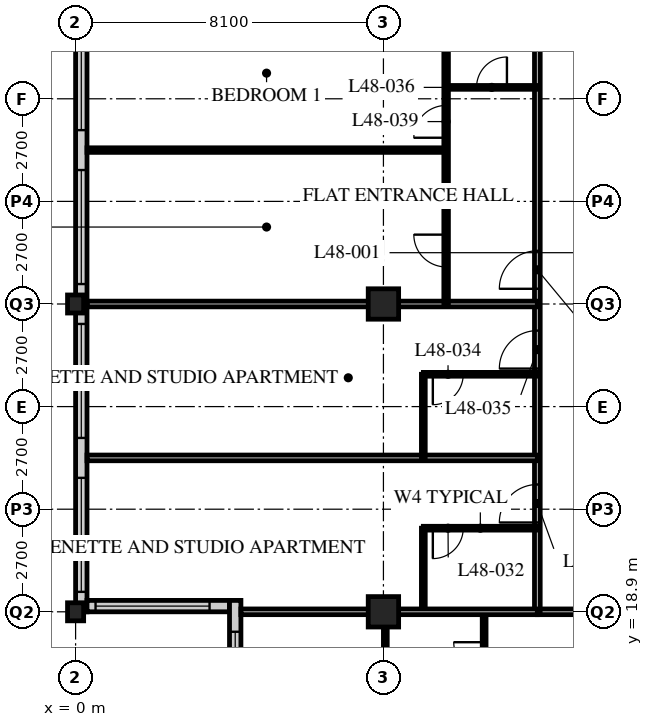
"""IFC4 building model, lengths in metres.
Left out: names, types, materials, properties, quantities, classifications, styles, units other than length and angle.
Written with IfcOpenShell. Run it as: python <this file> out.ifc"""

import sys

from ifc_helpers import new_model, si_unit, direction, frame, frame_2d, origin, origin_2d, place, context, subcontext, project, spatial, rectangle, hollow_rectangle, i_section, extrude, element, fill, save


model = new_model("IFC4")
c1 = context("Model", 3, precision=1e-05, world=origin(), true_north=direction((0.0, 1.0)))
c2 = subcontext(c1, "Body", "Model", "MODEL_VIEW")
j1 = project(units=[si_unit("LENGTHUNIT", "METRE"), si_unit("PLANEANGLEUNIT", "RADIAN")], contexts=[c1])
p1 = place(None, origin())
s1 = spatial("IfcSite", under=j1, at=p1, CompositionType="ELEMENT")
p2 = place(p1, origin())
s2 = spatial("IfcBuilding", under=s1, at=p2, CompositionType="ELEMENT")
p3 = place(p2, frame((0.0, 0.0, 188.4)))
s3 = spatial("IfcBuildingStorey", under=s2, at=p3, CompositionType="ELEMENT", Elevation=188.4)
for number, where, z_axis, x_axis in (
    (1, (0.0, 18.9, 0.0), (0.0, 0.0, 1.0), (1.0, 0.0, 0.0)),
    (2, (0.0, 27.0, 0.0), (0.0, 0.0, 1.0), (1.0, 0.0, 0.0)),
):
    element("IfcColumn", number, at=place(p3, frame(where, z_axis=z_axis, x_axis=x_axis)), inside=s3, PredefinedType="COLUMN", context=c2, shape_type="SweptSolid", body=[
        extrude(i_section(OverallWidth=0.424, OverallDepth=0.475, WebThickness=0.048, FlangeThickness=0.077, FilletRadius=0.015, at=origin_2d()), origin(), (0.0, 0.0, 1.0), 3.6),
    ])
for number, where, z_axis, x_axis in (
    (3, (8.1, 18.9, 0.0), (0.0, 0.0, 1.0), (1.0, 0.0, 0.0)),
    (4, (8.1, 27.0, 0.0), (0.0, 0.0, 1.0), (1.0, 0.0, 0.0)),
):
    element("IfcColumn", number, at=place(p3, frame(where, z_axis=z_axis, x_axis=x_axis)), inside=s3, PredefinedType="COLUMN", context=c2, shape_type="SweptSolid", body=[
        extrude(hollow_rectangle(XDim=0.8, YDim=0.8, WallThickness=0.08, at=origin_2d()), origin(), (0.0, 0.0, 1.0), 3.6),
    ])
p4 = place(p3, frame((0.15, 51.0, 0.0), z_axis=(0.0, 0.0, 1.0), x_axis=(0.0, -1.0, 0.0)))
e5 = element("IfcWall", 5, at=p4, inside=s3, PredefinedType="SOLIDWALL", context=c2, shape_type="SweptSolid", body=[
    extrude(rectangle(XDim=32.1, YDim=0.3, at=frame_2d((16.05, 0.0))), origin(), (0.0, 0.0, 1.0), 3.39),
])
p5 = place(p4, frame((0.225, 0.0, 0.6)))
e6 = element("IfcOpeningElement", 6, at=p5, cuts=e5, PredefinedType="OPENING", context=c2, shape_type="SweptSolid", body=[
    extrude(rectangle(XDim=3.0, YDim=2.4, at=frame_2d((1.5, 1.2))), frame((0.0, 0.16, 0.0), z_axis=(0.0, -1.0, 0.0), x_axis=(1.0, 0.0, 0.0)), (0.0, 0.0, 1.0), 0.32),
])
p6 = place(p4, frame((4.275, 0.0, 0.6)))
e7 = element("IfcOpeningElement", 7, at=p6, cuts=e5, PredefinedType="OPENING", context=c2, shape_type="SweptSolid", body=[
    extrude(rectangle(XDim=3.0, YDim=2.4, at=frame_2d((1.5, 1.2))), frame((0.0, 0.16, 0.0), z_axis=(0.0, -1.0, 0.0), x_axis=(1.0, 0.0, 0.0)), (0.0, 0.0, 1.0), 0.32),
])
p7 = place(p4, frame((8.325, 0.0, 0.6)))
e8 = element("IfcOpeningElement", 8, at=p7, cuts=e5, PredefinedType="OPENING", context=c2, shape_type="SweptSolid", body=[
    extrude(rectangle(XDim=3.0, YDim=2.4, at=frame_2d((1.5, 1.2))), frame((0.0, 0.16, 0.0), z_axis=(0.0, -1.0, 0.0), x_axis=(1.0, 0.0, 0.0)), (0.0, 0.0, 1.0), 0.32),
])
p8 = place(p4, frame((12.375, 0.0, 0.6)))
e9 = element("IfcOpeningElement", 9, at=p8, cuts=e5, PredefinedType="OPENING", context=c2, shape_type="SweptSolid", body=[
    extrude(rectangle(XDim=3.0, YDim=2.4, at=frame_2d((1.5, 1.2))), frame((0.0, 0.16, 0.0), z_axis=(0.0, -1.0, 0.0), x_axis=(1.0, 0.0, 0.0)), (0.0, 0.0, 1.0), 0.32),
])
p9 = place(p4, frame((16.425, 0.0, 0.6)))
e10 = element("IfcOpeningElement", 10, at=p9, cuts=e5, PredefinedType="OPENING", context=c2, shape_type="SweptSolid", body=[
    extrude(rectangle(XDim=3.0, YDim=2.4, at=frame_2d((1.5, 1.2))), frame((0.0, 0.16, 0.0), z_axis=(0.0, -1.0, 0.0), x_axis=(1.0, 0.0, 0.0)), (0.0, 0.0, 1.0), 0.32),
])
p10 = place(p4, frame((20.475, 0.0, 0.6)))
e11 = element("IfcOpeningElement", 11, at=p10, cuts=e5, PredefinedType="OPENING", context=c2, shape_type="SweptSolid", body=[
    extrude(rectangle(XDim=3.0, YDim=2.4, at=frame_2d((1.5, 1.2))), frame((0.0, 0.16, 0.0), z_axis=(0.0, -1.0, 0.0), x_axis=(1.0, 0.0, 0.0)), (0.0, 0.0, 1.0), 0.32),
])
p11 = place(p4, frame((24.525, 0.0, 0.6)))
e12 = element("IfcOpeningElement", 12, at=p11, cuts=e5, PredefinedType="OPENING", context=c2, shape_type="SweptSolid", body=[
    extrude(rectangle(XDim=3.0, YDim=2.4, at=frame_2d((1.5, 1.2))), frame((0.0, 0.16, 0.0), z_axis=(0.0, -1.0, 0.0), x_axis=(1.0, 0.0, 0.0)), (0.0, 0.0, 1.0), 0.32),
])
p12 = place(p4, frame((28.575, 0.0, 0.6)))
e13 = element("IfcOpeningElement", 13, at=p12, cuts=e5, PredefinedType="OPENING", context=c2, shape_type="SweptSolid", body=[
    extrude(rectangle(XDim=3.0, YDim=2.4, at=frame_2d((1.5, 1.2))), frame((0.0, 0.16, 0.0), z_axis=(0.0, -1.0, 0.0), x_axis=(1.0, 0.0, 0.0)), (0.0, 0.0, 1.0), 0.32),
])
p13 = place(p3, frame((0.3, 19.05, 0.0), z_axis=(0.0, 0.0, 1.0), x_axis=(1.0, 0.0, 0.0)))
e14 = element("IfcWall", 14, at=p13, inside=s3, PredefinedType="SOLIDWALL", context=c2, shape_type="SweptSolid", body=[
    extrude(rectangle(XDim=3.75, YDim=0.3, at=frame_2d((1.875, 0.0))), origin(), (0.0, 0.0, 1.0), 3.39),
])
p14 = place(p13, frame((0.225, 0.0, 0.6)))
e15 = element("IfcOpeningElement", 15, at=p14, cuts=e14, PredefinedType="OPENING", context=c2, shape_type="SweptSolid", body=[
    extrude(rectangle(XDim=3.0, YDim=2.0, at=frame_2d((1.5, 1.0))), frame((0.0, 0.16, 0.0), z_axis=(0.0, -1.0, 0.0), x_axis=(1.0, 0.0, 0.0)), (0.0, 0.0, 1.0), 0.32),
])
p15 = place(p3, frame((4.2, 19.2, 0.0), z_axis=(0.0, 0.0, 1.0), x_axis=(0.0, -1.0, 0.0)))
e16 = element("IfcWall", 16, at=p15, inside=s3, PredefinedType="SOLIDWALL", context=c2, shape_type="SweptSolid", body=[
    extrude(rectangle(XDim=4.35, YDim=0.3, at=frame_2d((2.175, 0.0))), origin(), (0.0, 0.0, 1.0), 3.39),
])
p16 = place(p15, frame((0.825, 0.0, 0.6)))
e17 = element("IfcOpeningElement", 17, at=p16, cuts=e16, PredefinedType="OPENING", context=c2, shape_type="SweptSolid", body=[
    extrude(rectangle(XDim=3.0, YDim=2.0, at=frame_2d((1.5, 1.0))), frame((0.0, 0.16, 0.0), z_axis=(0.0, -1.0, 0.0), x_axis=(1.0, 0.0, 0.0)), (0.0, 0.0, 1.0), 0.32),
])
p17 = place(p3, frame((12.15, 18.9, 0.0), z_axis=(0.0, 0.0, 1.0), x_axis=(1.0, 0.0, 0.0)))
e18 = element("IfcWall", 18, at=p17, inside=s3, PredefinedType="PARTITIONING", context=c2, shape_type="SweptSolid", body=[
    extrude(rectangle(XDim=32.4, YDim=0.15, at=frame_2d((16.2, 0.0))), origin(), (0.0, 0.0, 1.0), 2.778),
])
p18 = place(p17, frame((4.95, 0.0, 0.0)))
e19 = element("IfcOpeningElement", 19, at=p18, cuts=e18, PredefinedType="OPENING", context=c2, shape_type="SweptSolid", body=[
    extrude(rectangle(XDim=1.0, YDim=2.1, at=frame_2d((0.5, 1.05))), frame((0.0, 0.085, 0.0), z_axis=(0.0, -1.0, 0.0), x_axis=(1.0, 0.0, 0.0)), (0.0, 0.0, 1.0), 0.17),
])
p19 = place(p17, frame((13.05, 0.0, 0.0)))
e20 = element("IfcOpeningElement", 20, at=p19, cuts=e18, PredefinedType="OPENING", context=c2, shape_type="SweptSolid", body=[
    extrude(rectangle(XDim=1.0, YDim=2.1, at=frame_2d((0.5, 1.05))), frame((0.0, 0.085, 0.0), z_axis=(0.0, -1.0, 0.0), x_axis=(1.0, 0.0, 0.0)), (0.0, 0.0, 1.0), 0.17),
])
p20 = place(p17, frame((21.15, 0.0, 0.0)))
e21 = element("IfcOpeningElement", 21, at=p20, cuts=e18, PredefinedType="OPENING", context=c2, shape_type="SweptSolid", body=[
    extrude(rectangle(XDim=1.0, YDim=2.1, at=frame_2d((0.5, 1.05))), frame((0.0, 0.085, 0.0), z_axis=(0.0, -1.0, 0.0), x_axis=(1.0, 0.0, 0.0)), (0.0, 0.0, 1.0), 0.17),
])
p21 = place(p17, frame((1.525, 0.0, 0.0)))
e22 = element("IfcOpeningElement", 22, at=p21, cuts=e18, PredefinedType="OPENING", context=c2, shape_type="SweptSolid", body=[
    extrude(rectangle(XDim=1.0, YDim=2.1, at=frame_2d((0.5, 1.05))), frame((0.0, 0.085, 0.0), z_axis=(0.0, -1.0, 0.0), x_axis=(1.0, 0.0, 0.0)), (0.0, 0.0, 1.0), 0.17),
])
p22 = place(p17, frame((29.875, 0.0, 0.0)))
e23 = element("IfcOpeningElement", 23, at=p22, cuts=e18, PredefinedType="OPENING", context=c2, shape_type="SweptSolid", body=[
    extrude(rectangle(XDim=1.0, YDim=2.1, at=frame_2d((0.5, 1.05))), frame((0.0, 0.085, 0.0), z_axis=(0.0, -1.0, 0.0), x_axis=(1.0, 0.0, 0.0)), (0.0, 0.0, 1.0), 0.17),
])
p23 = place(p3, frame((12.15, 18.9, 0.0), z_axis=(0.0, 0.0, 1.0), x_axis=(0.0, 1.0, 0.0)))
e24 = element("IfcWall", 24, at=p23, inside=s3, PredefinedType="PARTITIONING", context=c2, shape_type="SweptSolid", body=[
    extrude(rectangle(XDim=28.35, YDim=0.15, at=frame_2d((14.175, 0.0))), origin(), (0.0, 0.0, 1.0), 3.39),
])
p24 = place(p23, frame((2.35, 0.0, 0.0)))
e25 = element("IfcOpeningElement", 25, at=p24, cuts=e24, PredefinedType="OPENING", context=c2, shape_type="SweptSolid", body=[
    extrude(rectangle(XDim=1.0, YDim=2.1, at=frame_2d((0.5, 1.05))), frame((0.0, 0.085, 0.0), z_axis=(0.0, -1.0, 0.0), x_axis=(1.0, 0.0, 0.0)), (0.0, 0.0, 1.0), 0.17),
])
p25 = place(p23, frame((6.4, 0.0, 0.0)))
e26 = element("IfcOpeningElement", 26, at=p25, cuts=e24, PredefinedType="OPENING", context=c2, shape_type="SweptSolid", body=[
    extrude(rectangle(XDim=1.0, YDim=2.1, at=frame_2d((0.5, 1.05))), frame((0.0, 0.085, 0.0), z_axis=(0.0, -1.0, 0.0), x_axis=(1.0, 0.0, 0.0)), (0.0, 0.0, 1.0), 0.17),
])
p26 = place(p23, frame((8.5, 0.0, 0.0)))
e27 = element("IfcOpeningElement", 27, at=p26, cuts=e24, PredefinedType="OPENING", context=c2, shape_type="SweptSolid", body=[
    extrude(rectangle(XDim=1.0, YDim=2.1, at=frame_2d((0.5, 1.05))), frame((0.0, 0.085, 0.0), z_axis=(0.0, -1.0, 0.0), x_axis=(1.0, 0.0, 0.0)), (0.0, 0.0, 1.0), 0.17),
])
p27 = place(p23, frame((16.6, 0.0, 0.0)))
e28 = element("IfcOpeningElement", 28, at=p27, cuts=e24, PredefinedType="OPENING", context=c2, shape_type="SweptSolid", body=[
    extrude(rectangle(XDim=1.0, YDim=2.1, at=frame_2d((0.5, 1.05))), frame((0.0, 0.085, 0.0), z_axis=(0.0, -1.0, 0.0), x_axis=(1.0, 0.0, 0.0)), (0.0, 0.0, 1.0), 0.17),
])
p28 = place(p23, frame((26.65, 0.0, 0.0)))
e29 = element("IfcOpeningElement", 29, at=p28, cuts=e24, PredefinedType="OPENING", context=c2, shape_type="SweptSolid", body=[
    extrude(rectangle(XDim=1.0, YDim=2.1, at=frame_2d((0.5, 1.05))), frame((0.0, 0.085, 0.0), z_axis=(0.0, -1.0, 0.0), x_axis=(1.0, 0.0, 0.0)), (0.0, 0.0, 1.0), 0.17),
])
p29 = place(p3, frame((9.15, 18.9, 0.0), z_axis=(0.0, 0.0, 1.0), x_axis=(0.0, 1.0, 0.0)))
e30 = element("IfcWall", 30, at=p29, inside=s3, PredefinedType="PARTITIONING", context=c2, shape_type="SweptSolid", body=[
    extrude(rectangle(XDim=2.2, YDim=0.1, at=frame_2d((1.1, 0.0))), origin(), (0.0, 0.0, 1.0), 3.39),
])
p30 = place(p3, frame((12.15, 21.1, 0.0), z_axis=(0.0, 0.0, 1.0), x_axis=(-1.0, 0.0, 0.0)))
e31 = element("IfcWall", 31, at=p30, inside=s3, PredefinedType="PARTITIONING", context=c2, shape_type="SweptSolid", body=[
    extrude(rectangle(XDim=3.0, YDim=0.1, at=frame_2d((1.5, 0.0))), origin(), (0.0, 0.0, 1.0), 3.39),
])
p31 = place(p30, frame((1.95, 0.0, 0.0)))
e32 = element("IfcOpeningElement", 32, at=p31, cuts=e31, PredefinedType="OPENING", context=c2, shape_type="SweptSolid", body=[
    extrude(rectangle(XDim=0.8, YDim=2.1, at=frame_2d((0.4, 1.05))), frame((0.0, 0.06, 0.0), z_axis=(0.0, -1.0, 0.0), x_axis=(1.0, 0.0, 0.0)), (0.0, 0.0, 1.0), 0.12),
])
p32 = place(p3, frame((12.15, 22.95, 0.0), z_axis=(0.0, 0.0, 1.0), x_axis=(-1.0, 0.0, 0.0)))
e33 = element("IfcWall", 33, at=p32, inside=s3, PredefinedType="PARTITIONING", context=c2, shape_type="SweptSolid", body=[
    extrude(rectangle(XDim=11.85, YDim=0.15, at=frame_2d((5.925, 0.0))), origin(), (0.0, 0.0, 1.0), 3.39),
])
p33 = place(p3, frame((9.15, 22.95, 0.0), z_axis=(0.0, 0.0, 1.0), x_axis=(0.0, 1.0, 0.0)))
e34 = element("IfcWall", 34, at=p33, inside=s3, PredefinedType="PARTITIONING", context=c2, shape_type="SweptSolid", body=[
    extrude(rectangle(XDim=2.2, YDim=0.1, at=frame_2d((1.1, 0.0))), origin(), (0.0, 0.0, 1.0), 3.39),
])
p34 = place(p3, frame((12.15, 25.15, 0.0), z_axis=(0.0, 0.0, 1.0), x_axis=(-1.0, 0.0, 0.0)))
e35 = element("IfcWall", 35, at=p34, inside=s3, PredefinedType="PARTITIONING", context=c2, shape_type="SweptSolid", body=[
    extrude(rectangle(XDim=3.0, YDim=0.1, at=frame_2d((1.5, 0.0))), origin(), (0.0, 0.0, 1.0), 3.39),
])
p35 = place(p34, frame((1.95, 0.0, 0.0)))
e36 = element("IfcOpeningElement", 36, at=p35, cuts=e35, PredefinedType="OPENING", context=c2, shape_type="SweptSolid", body=[
    extrude(rectangle(XDim=0.8, YDim=2.1, at=frame_2d((0.4, 1.05))), frame((0.0, 0.06, 0.0), z_axis=(0.0, -1.0, 0.0), x_axis=(1.0, 0.0, 0.0)), (0.0, 0.0, 1.0), 0.12),
])
p36 = place(p3, frame((12.15, 27.0, 0.0), z_axis=(0.0, 0.0, 1.0), x_axis=(-1.0, 0.0, 0.0)))
e37 = element("IfcWall", 37, at=p36, inside=s3, PredefinedType="PARTITIONING", context=c2, shape_type="SweptSolid", body=[
    extrude(rectangle(XDim=11.85, YDim=0.15, at=frame_2d((5.925, 0.0))), origin(), (0.0, 0.0, 1.0), 2.778),
])
p37 = place(p3, frame((9.75, 27.0, 0.0), z_axis=(0.0, 0.0, 1.0), x_axis=(0.0, 1.0, 0.0)))
e38 = element("IfcWall", 38, at=p37, inside=s3, PredefinedType="PARTITIONING", context=c2, shape_type="SweptSolid", body=[
    extrude(rectangle(XDim=16.2, YDim=0.12, at=frame_2d((8.1, 0.0))), origin(), (0.0, 0.0, 1.0), 3.39),
])
p38 = place(p37, frame((0.975, 0.0, 0.0)))
e39 = element("IfcOpeningElement", 39, at=p38, cuts=e38, PredefinedType="OPENING", context=c2, shape_type="SweptSolid", body=[
    extrude(rectangle(XDim=0.85, YDim=2.1, at=frame_2d((0.425, 1.05))), frame((0.0, 0.07, 0.0), z_axis=(0.0, -1.0, 0.0), x_axis=(1.0, 0.0, 0.0)), (0.0, 0.0, 1.0), 0.14),
])
p39 = place(p37, frame((4.375, 0.0, 0.0)))
e40 = element("IfcOpeningElement", 40, at=p39, cuts=e38, PredefinedType="OPENING", context=c2, shape_type="SweptSolid", body=[
    extrude(rectangle(XDim=0.85, YDim=2.1, at=frame_2d((0.425, 1.05))), frame((0.0, 0.07, 0.0), z_axis=(0.0, -1.0, 0.0), x_axis=(1.0, 0.0, 0.0)), (0.0, 0.0, 1.0), 0.14),
])
p40 = place(p37, frame((9.075, 0.0, 0.0)))
e41 = element("IfcOpeningElement", 41, at=p40, cuts=e38, PredefinedType="OPENING", context=c2, shape_type="SweptSolid", body=[
    extrude(rectangle(XDim=0.85, YDim=2.1, at=frame_2d((0.425, 1.05))), frame((0.0, 0.07, 0.0), z_axis=(0.0, -1.0, 0.0), x_axis=(1.0, 0.0, 0.0)), (0.0, 0.0, 1.0), 0.14),
])
p41 = place(p37, frame((12.475, 0.0, 0.0)))
e42 = element("IfcOpeningElement", 42, at=p41, cuts=e38, PredefinedType="OPENING", context=c2, shape_type="SweptSolid", body=[
    extrude(rectangle(XDim=0.85, YDim=2.1, at=frame_2d((0.425, 1.05))), frame((0.0, 0.07, 0.0), z_axis=(0.0, -1.0, 0.0), x_axis=(1.0, 0.0, 0.0)), (0.0, 0.0, 1.0), 0.14),
])
p42 = place(p3, frame((12.15, 32.7, 0.0), z_axis=(0.0, 0.0, 1.0), x_axis=(-1.0, 0.0, 0.0)))
e43 = element("IfcWall", 43, at=p42, inside=s3, PredefinedType="PARTITIONING", context=c2, shape_type="SweptSolid", body=[
    extrude(rectangle(XDim=2.4, YDim=0.1, at=frame_2d((1.2, 0.0))), origin(), (0.0, 0.0, 1.0), 3.39),
])
p43 = place(p42, frame((0.8, 0.0, 0.0)))
e44 = element("IfcOpeningElement", 44, at=p43, cuts=e43, PredefinedType="OPENING", context=c2, shape_type="SweptSolid", body=[
    extrude(rectangle(XDim=0.8, YDim=2.1, at=frame_2d((0.4, 1.05))), frame((0.0, 0.06, 0.0), z_axis=(0.0, -1.0, 0.0), x_axis=(1.0, 0.0, 0.0)), (0.0, 0.0, 1.0), 0.12),
])
p44 = place(p3, frame((9.75, 31.05, 0.0), z_axis=(0.0, 0.0, 1.0), x_axis=(-1.0, 0.0, 0.0)))
e45 = element("IfcWall", 45, at=p44, inside=s3, PredefinedType="PARTITIONING", context=c2, shape_type="SweptSolid", body=[
    extrude(rectangle(XDim=9.45, YDim=0.12, at=frame_2d((4.725, 0.0))), origin(), (0.0, 0.0, 1.0), 3.39),
])
p45 = place(p3, frame((10.75, 18.9, 0.0), z_axis=(0.0, 0.0, 1.0), x_axis=(0.0, -1.0, 0.0)))
e46 = element("IfcWall", 46, at=p45, inside=s3, PredefinedType="PARTITIONING", context=c2, shape_type="SweptSolid", body=[
    extrude(rectangle(XDim=2.4, YDim=0.1, at=frame_2d((1.2, 0.0))), origin(), (0.0, 0.0, 1.0), 3.39),
])
p46 = place(p45, frame((0.8, 0.0, 0.0)))
e47 = element("IfcOpeningElement", 47, at=p46, cuts=e46, PredefinedType="OPENING", context=c2, shape_type="SweptSolid", body=[
    extrude(rectangle(XDim=0.8, YDim=2.1, at=frame_2d((0.4, 1.05))), frame((0.0, 0.06, 0.0), z_axis=(0.0, -1.0, 0.0), x_axis=(1.0, 0.0, 0.0)), (0.0, 0.0, 1.0), 0.12),
])
p47 = place(p3, frame((8.15, 18.9, 0.0), z_axis=(0.0, 0.0, 1.0), x_axis=(0.0, -1.0, 0.0)))
e48 = element("IfcWall", 48, at=p47, inside=s3, PredefinedType="PARTITIONING", context=c2, shape_type="SweptSolid", body=[
    extrude(rectangle(XDim=2.4, YDim=0.1, at=frame_2d((1.2, 0.0))), origin(), (0.0, 0.0, 1.0), 2.778),
])
p48 = place(p3, frame((4.35, 18.9, 0.0), z_axis=(0.0, 0.0, 1.0), x_axis=(1.0, 0.0, 0.0)))
e49 = element("IfcWall", 49, at=p48, inside=s3, PredefinedType="PARTITIONING", context=c2, shape_type="SweptSolid", body=[
    extrude(rectangle(XDim=7.8, YDim=0.15, at=frame_2d((3.9, 0.0))), origin(), (0.0, 0.0, 1.0), 2.778),
])
p49 = place(p9, origin())
e50 = element("IfcWindow", 50, at=p49, inside=s3, PartitioningType="SINGLE_PANEL", PredefinedType="WINDOW", context=c2, shape_type="SweptSolid", body=[
    extrude(rectangle(XDim=3.0, YDim=2.4, at=frame_2d((1.5, 1.2))), frame((0.0, 0.03, 0.0), z_axis=(0.0, -1.0, 0.0), x_axis=(1.0, 0.0, 0.0)), (0.0, 0.0, 1.0), 0.06),
])
fill(e10, e50)
p50 = place(p10, origin())
e51 = element("IfcWindow", 51, at=p50, inside=s3, PartitioningType="SINGLE_PANEL", PredefinedType="WINDOW", context=c2, shape_type="SweptSolid", body=[
    extrude(rectangle(XDim=3.0, YDim=2.4, at=frame_2d((1.5, 1.2))), frame((0.0, 0.03, 0.0), z_axis=(0.0, -1.0, 0.0), x_axis=(1.0, 0.0, 0.0)), (0.0, 0.0, 1.0), 0.06),
])
fill(e11, e51)
p51 = place(p11, origin())
e52 = element("IfcWindow", 52, at=p51, inside=s3, PartitioningType="SINGLE_PANEL", PredefinedType="WINDOW", context=c2, shape_type="SweptSolid", body=[
    extrude(rectangle(XDim=3.0, YDim=2.4, at=frame_2d((1.5, 1.2))), frame((0.0, 0.03, 0.0), z_axis=(0.0, -1.0, 0.0), x_axis=(1.0, 0.0, 0.0)), (0.0, 0.0, 1.0), 0.06),
])
fill(e12, e52)
p52 = place(p12, origin())
e53 = element("IfcWindow", 53, at=p52, inside=s3, PartitioningType="SINGLE_PANEL", PredefinedType="WINDOW", context=c2, shape_type="SweptSolid", body=[
    extrude(rectangle(XDim=3.0, YDim=2.4, at=frame_2d((1.5, 1.2))), frame((0.0, 0.03, 0.0), z_axis=(0.0, -1.0, 0.0), x_axis=(1.0, 0.0, 0.0)), (0.0, 0.0, 1.0), 0.06),
])
fill(e13, e53)
p53 = place(p14, origin())
e54 = element("IfcWindow", 54, at=p53, inside=s3, PartitioningType="SINGLE_PANEL", PredefinedType="WINDOW", context=c2, shape_type="SweptSolid", body=[
    extrude(rectangle(XDim=3.0, YDim=2.0, at=frame_2d((1.5, 1.0))), frame((0.0, 0.03, 0.0), z_axis=(0.0, -1.0, 0.0), x_axis=(1.0, 0.0, 0.0)), (0.0, 0.0, 1.0), 0.06),
])
fill(e15, e54)
p54 = place(p16, origin())
e55 = element("IfcWindow", 55, at=p54, inside=s3, PartitioningType="SINGLE_PANEL", PredefinedType="WINDOW", context=c2, shape_type="SweptSolid", body=[
    extrude(rectangle(XDim=3.0, YDim=2.0, at=frame_2d((1.5, 1.0))), frame((0.0, 0.03, 0.0), z_axis=(0.0, -1.0, 0.0), x_axis=(1.0, 0.0, 0.0)), (0.0, 0.0, 1.0), 0.06),
])
fill(e17, e55)
p55 = place(p31, origin())
e56 = element("IfcDoor", 56, at=p55, inside=s3, OperationType="SINGLE_SWING_RIGHT", PredefinedType="DOOR", context=c2, shape_type="SweptSolid", body=[
    extrude(rectangle(XDim=0.8, YDim=2.1, at=frame_2d((0.4, 1.05))), frame((0.0, 0.025, 0.0), z_axis=(0.0, -1.0, 0.0), x_axis=(1.0, 0.0, 0.0)), (0.0, 0.0, 1.0), 0.05),
])
fill(e32, e56)
p56 = place(p24, origin())
e57 = element("IfcDoor", 57, at=p56, inside=s3, OperationType="SINGLE_SWING_LEFT", PredefinedType="DOOR", context=c2, shape_type="SweptSolid", body=[
    extrude(rectangle(XDim=1.0, YDim=2.1, at=frame_2d((0.5, 1.05))), frame((0.0, 0.025, 0.0), z_axis=(0.0, -1.0, 0.0), x_axis=(1.0, 0.0, 0.0)), (0.0, 0.0, 1.0), 0.05),
])
fill(e25, e57)
p57 = place(p35, origin())
e58 = element("IfcDoor", 58, at=p57, inside=s3, OperationType="SINGLE_SWING_RIGHT", PredefinedType="DOOR", context=c2, shape_type="SweptSolid", body=[
    extrude(rectangle(XDim=0.8, YDim=2.1, at=frame_2d((0.4, 1.05))), frame((0.0, 0.025, 0.0), z_axis=(0.0, -1.0, 0.0), x_axis=(1.0, 0.0, 0.0)), (0.0, 0.0, 1.0), 0.05),
])
fill(e36, e58)
p58 = place(p25, origin())
e59 = element("IfcDoor", 59, at=p58, inside=s3, OperationType="SINGLE_SWING_LEFT", PredefinedType="DOOR", context=c2, shape_type="SweptSolid", body=[
    extrude(rectangle(XDim=1.0, YDim=2.1, at=frame_2d((0.5, 1.05))), frame((0.0, 0.025, 0.0), z_axis=(0.0, -1.0, 0.0), x_axis=(1.0, 0.0, 0.0)), (0.0, 0.0, 1.0), 0.05),
])
fill(e26, e59)
p59 = place(p43, origin())
e60 = element("IfcDoor", 60, at=p59, inside=s3, OperationType="SINGLE_SWING_RIGHT", PredefinedType="DOOR", context=c2, shape_type="SweptSolid", body=[
    extrude(rectangle(XDim=0.8, YDim=2.1, at=frame_2d((0.4, 1.05))), frame((0.0, 0.025, 0.0), z_axis=(0.0, -1.0, 0.0), x_axis=(1.0, 0.0, 0.0)), (0.0, 0.0, 1.0), 0.05),
])
fill(e44, e60)
p60 = place(p26, origin())
e61 = element("IfcDoor", 61, at=p60, inside=s3, OperationType="SINGLE_SWING_LEFT", PredefinedType="DOOR", context=c2, shape_type="SweptSolid", body=[
    extrude(rectangle(XDim=1.0, YDim=2.1, at=frame_2d((0.5, 1.05))), frame((0.0, 0.025, 0.0), z_axis=(0.0, -1.0, 0.0), x_axis=(1.0, 0.0, 0.0)), (0.0, 0.0, 1.0), 0.05),
])
fill(e27, e61)
p61 = place(p38, origin())
e62 = element("IfcDoor", 62, at=p61, inside=s3, OperationType="SINGLE_SWING_RIGHT", PredefinedType="DOOR", context=c2, shape_type="SweptSolid", body=[
    extrude(rectangle(XDim=0.85, YDim=2.1, at=frame_2d((0.425, 1.05))), frame((0.0, 0.025, 0.0), z_axis=(0.0, -1.0, 0.0), x_axis=(1.0, 0.0, 0.0)), (0.0, 0.0, 1.0), 0.05),
])
fill(e39, e62)
p62 = place(p39, origin())
e63 = element("IfcDoor", 63, at=p62, inside=s3, OperationType="SINGLE_SWING_LEFT", PredefinedType="DOOR", context=c2, shape_type="SweptSolid", body=[
    extrude(rectangle(XDim=0.85, YDim=2.1, at=frame_2d((0.425, 1.05))), frame((0.0, 0.025, 0.0), z_axis=(0.0, -1.0, 0.0), x_axis=(1.0, 0.0, 0.0)), (0.0, 0.0, 1.0), 0.05),
])
fill(e40, e63)
p63 = place(p46, origin())
e64 = element("IfcDoor", 64, at=p63, inside=s3, OperationType="SINGLE_SWING_RIGHT", PredefinedType="DOOR", context=c2, shape_type="SweptSolid", body=[
    extrude(rectangle(XDim=0.8, YDim=2.1, at=frame_2d((0.4, 1.05))), frame((0.0, 0.025, 0.0), z_axis=(0.0, -1.0, 0.0), x_axis=(1.0, 0.0, 0.0)), (0.0, 0.0, 1.0), 0.05),
])
fill(e47, e64)
save(model, sys.argv[1])
